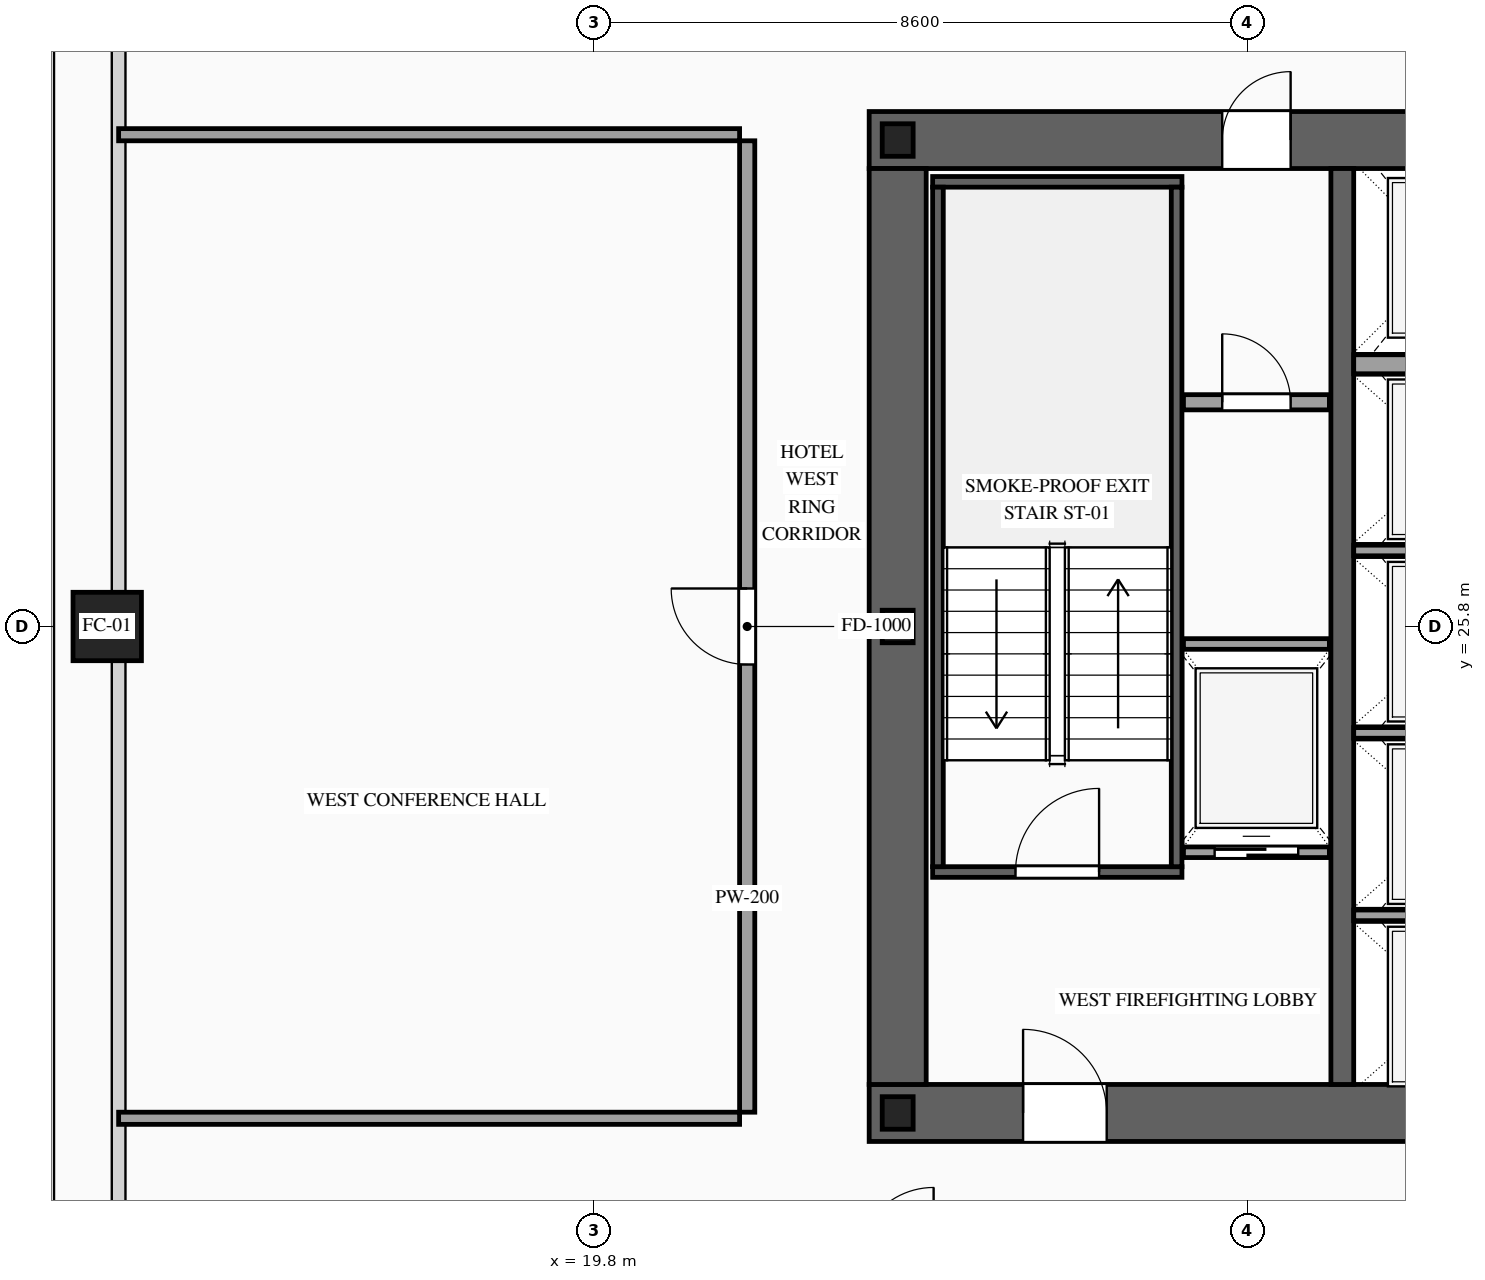
"""IFC4 building model, lengths in metres.
Left out: names, types, materials, properties, quantities, classifications, styles, units other than length and angle.
Written with IfcOpenShell. Run it as: python <this file> out.ifc"""

import sys

from ifc_helpers import new_model, si_unit, direction, frame, frame_2d, origin, origin_2d, place, context, subcontext, project, spatial, rectangle, hollow_rectangle, i_section, extrude, source, transform, mapped, element, fill, save


model = new_model("IFC4")
c1 = context("Model", 3, precision=1e-05, world=origin(), true_north=direction((0.0, 1.0)))
c2 = subcontext(c1, "Body", "Model", "MODEL_VIEW")
j1 = project(units=[si_unit("LENGTHUNIT", "METRE"), si_unit("PLANEANGLEUNIT", "RADIAN")], contexts=[c1])
p1 = place(None, origin())
s1 = spatial("IfcSite", under=j1, at=p1, CompositionType="ELEMENT")
p2 = place(p1, origin())
s2 = spatial("IfcBuilding", under=s1, at=p2, CompositionType="ELEMENT")
p3 = place(p2, frame((0.0, 0.0, 111.8)))
s3 = spatial("IfcBuildingStorey", under=s2, at=p3, CompositionType="ELEMENT", Elevation=111.8)
p4 = place(p3, frame((23.425, 19.4, 0.0), z_axis=(0.0, 0.0, 1.0), x_axis=(1.0, 0.0, 0.0)))
e1 = element("IfcWall", 1, at=p4, inside=s3, PredefinedType="SHEAR", context=c2, shape_type="SweptSolid", body=[
    extrude(rectangle(XDim=27.15, YDim=0.75, at=frame_2d((13.575, 0.0))), origin(), (0.0, 0.0, 1.0), 3.6),
])
p5 = place(p4, frame((2.025, 0.0, 0.0)))
e2 = element("IfcOpeningElement", 2, at=p5, cuts=e1, PredefinedType="OPENING", context=c2, shape_type="SweptSolid", body=[
    extrude(rectangle(XDim=1.1, YDim=2.2, at=frame_2d((0.55, 1.1))), frame((0.0, 0.39, 0.0), z_axis=(0.0, -1.0, 0.0), x_axis=(1.0, 0.0, 0.0)), (0.0, 0.0, 1.0), 0.78),
])
p6 = place(p4, frame((9.925, 0.0, 0.0)))
e3 = element("IfcOpeningElement", 3, at=p6, cuts=e1, PredefinedType="OPENING", context=c2, shape_type="SweptSolid", body=[
    extrude(rectangle(XDim=1.1, YDim=2.2, at=frame_2d((0.55, 1.1))), frame((0.0, 0.39, 0.0), z_axis=(0.0, -1.0, 0.0), x_axis=(1.0, 0.0, 0.0)), (0.0, 0.0, 1.0), 0.78),
])
p7 = place(p4, frame((23.125, 0.0, 0.0)))
e4 = element("IfcOpeningElement", 4, at=p7, cuts=e1, PredefinedType="OPENING", context=c2, shape_type="SweptSolid", body=[
    extrude(rectangle(XDim=1.1, YDim=2.2, at=frame_2d((0.55, 1.1))), frame((0.0, 0.39, 0.0), z_axis=(0.0, -1.0, 0.0), x_axis=(1.0, 0.0, 0.0)), (0.0, 0.0, 1.0), 0.78),
])
p8 = place(p4, frame((19.745, 0.0, 0.0)))
e5 = element("IfcOpeningElement", 5, at=p8, cuts=e1, PredefinedType="OPENING", context=c2, shape_type="SweptSolid", body=[
    extrude(rectangle(XDim=0.9, YDim=2.15, at=frame_2d((0.45, 1.075))), frame((0.0, 0.39, 0.0), z_axis=(0.0, -1.0, 0.0), x_axis=(1.0, 0.0, 0.0)), (0.0, 0.0, 1.0), 0.78),
])
p9 = place(p4, frame((18.305, 0.0, 0.0)))
e6 = element("IfcOpeningElement", 6, at=p9, cuts=e1, PredefinedType="OPENING", context=c2, shape_type="SweptSolid", body=[
    extrude(rectangle(XDim=0.9, YDim=2.15, at=frame_2d((0.45, 1.075))), frame((0.0, 0.39, 0.0), z_axis=(0.0, -1.0, 0.0), x_axis=(1.0, 0.0, 0.0)), (0.0, 0.0, 1.0), 0.78),
])
p10 = place(p3, frame((23.425, 32.2, 0.0), z_axis=(0.0, 0.0, 1.0), x_axis=(1.0, 0.0, 0.0)))
e7 = element("IfcWall", 7, at=p10, inside=s3, PredefinedType="SHEAR", context=c2, shape_type="SweptSolid", body=[
    extrude(rectangle(XDim=27.15, YDim=0.75, at=frame_2d((13.575, 0.0))), origin(), (0.0, 0.0, 1.0), 3.6),
])
p11 = place(p10, frame((4.645, 0.0, 0.0)))
e8 = element("IfcOpeningElement", 8, at=p11, cuts=e7, PredefinedType="OPENING", context=c2, shape_type="SweptSolid", body=[
    extrude(rectangle(XDim=0.9, YDim=2.15, at=frame_2d((0.45, 1.075))), frame((0.0, 0.39, 0.0), z_axis=(0.0, -1.0, 0.0), x_axis=(1.0, 0.0, 0.0)), (0.0, 0.0, 1.0), 0.78),
])
p12 = place(p10, frame((9.925, 0.0, 0.0)))
e9 = element("IfcOpeningElement", 9, at=p12, cuts=e7, PredefinedType="OPENING", context=c2, shape_type="SweptSolid", body=[
    extrude(rectangle(XDim=1.1, YDim=2.2, at=frame_2d((0.55, 1.1))), frame((0.0, 0.39, 0.0), z_axis=(0.0, -1.0, 0.0), x_axis=(1.0, 0.0, 0.0)), (0.0, 0.0, 1.0), 0.78),
])
p13 = place(p10, frame((15.775, 0.0, 0.0)))
e10 = element("IfcOpeningElement", 10, at=p13, cuts=e7, PredefinedType="OPENING", context=c2, shape_type="SweptSolid", body=[
    extrude(rectangle(XDim=1.1, YDim=2.2, at=frame_2d((0.55, 1.1))), frame((0.0, 0.39, 0.0), z_axis=(0.0, -1.0, 0.0), x_axis=(1.0, 0.0, 0.0)), (0.0, 0.0, 1.0), 0.78),
])
p14 = place(p10, frame((18.305, 0.0, 0.0)))
e11 = element("IfcOpeningElement", 11, at=p14, cuts=e7, PredefinedType="OPENING", context=c2, shape_type="SweptSolid", body=[
    extrude(rectangle(XDim=0.9, YDim=2.15, at=frame_2d((0.45, 1.075))), frame((0.0, 0.39, 0.0), z_axis=(0.0, -1.0, 0.0), x_axis=(1.0, 0.0, 0.0)), (0.0, 0.0, 1.0), 0.78),
])
p15 = place(p10, frame((19.745, 0.0, 0.0)))
e12 = element("IfcOpeningElement", 12, at=p15, cuts=e7, PredefinedType="OPENING", context=c2, shape_type="SweptSolid", body=[
    extrude(rectangle(XDim=0.9, YDim=2.15, at=frame_2d((0.45, 1.075))), frame((0.0, 0.39, 0.0), z_axis=(0.0, -1.0, 0.0), x_axis=(1.0, 0.0, 0.0)), (0.0, 0.0, 1.0), 0.78),
])
m1 = source(origin(), c2, "Body", "SweptSolid", [
    extrude(rectangle(XDim=12.05, YDim=0.75, at=frame_2d((6.025, 0.0))), origin(), (0.0, 0.0, 1.0), 3.6),
])
p16 = place(p3, frame((23.8, 19.775, 0.0), z_axis=(0.0, 0.0, 1.0), x_axis=(0.0, 1.0, 0.0)))
e13 = element("IfcWall", 13, at=p16, inside=s3, PredefinedType="SHEAR", context=c2, shape_type="MappedRepresentation", body=[
    mapped(m1, transform((0.0, 0.0, 0.0), scale=1.0)),
])
m2 = source(origin(), c2, "Body", "SweptSolid", [
    extrude(rectangle(XDim=12.05, YDim=0.3, at=frame_2d((6.025, 0.0))), origin(), (0.0, 0.0, 1.0), 3.6),
])
p17 = place(p3, frame((29.65, 19.775, 0.0), z_axis=(0.0, 0.0, 1.0), x_axis=(0.0, 1.0, 0.0)))
e14 = element("IfcWall", 14, at=p17, inside=s3, PredefinedType="SOLIDWALL", context=c2, shape_type="MappedRepresentation", body=[
    mapped(m2, transform((0.0, 0.0, 0.0), scale=1.0)),
])
m3 = source(origin(), c2, "Body", "SweptSolid", [
    extrude(i_section(OverallWidth=0.407, OverallDepth=0.428, WebThickness=0.02, FlangeThickness=0.035, at=origin_2d()), origin(), (0.0, 0.0, 1.0), 3.6),
])
for number, where, z_axis, x_axis in (
    (15, (23.8, 19.4, 0.0), (0.0, 0.0, 1.0), (1.0, 0.0, 0.0)),
    (16, (23.8, 25.8, 0.0), (0.0, 0.0, 1.0), (1.0, 0.0, 0.0)),
    (17, (23.8, 32.2, 0.0), (0.0, 0.0, 1.0), (1.0, 0.0, 0.0)),
):
    element("IfcColumn", number, at=place(p3, frame(where, z_axis=z_axis, x_axis=x_axis)), inside=s3, PredefinedType="COLUMN", context=c2, shape_type="MappedRepresentation", body=[
        mapped(m3, transform((0.0, 0.0, 0.0), scale=1.0)),
    ])
m4 = source(origin(), c2, "Body", "SweptSolid", [
    extrude(hollow_rectangle(XDim=0.9, YDim=0.9, WallThickness=0.042, at=origin_2d()), origin(), (0.0, 0.0, 1.0), 3.6),
])
p18 = place(p3, frame((13.4, 25.8, 0.0), z_axis=(0.0, 0.0, 1.0), x_axis=(1.0, 0.0, 0.0)))
e18 = element("IfcColumn", 18, at=p18, inside=s3, PredefinedType="COLUMN", context=c2, shape_type="MappedRepresentation", body=[
    mapped(m4, transform((0.0, 0.0, 0.0), scale=1.0)),
])
p19 = place(p3, frame((27.56, 22.83, 0.0), z_axis=(0.0, 0.0, 1.0), x_axis=(1.0, 0.0, 0.0)))
e19 = element("IfcWall", 19, at=p19, inside=s3, PredefinedType="SOLIDWALL", context=c2, shape_type="SweptSolid", body=[
    extrude(rectangle(XDim=1.92, YDim=0.14, at=frame_2d((0.96, 0.0))), origin(), (0.0, 0.0, 1.0), 3.38),
])
p20 = place(p19, frame((0.41, 0.0, 0.0)))
e20 = element("IfcOpeningElement", 20, at=p20, cuts=e19, PredefinedType="OPENING", context=c2, shape_type="SweptSolid", body=[
    extrude(rectangle(XDim=1.1, YDim=2.2, at=frame_2d((0.55, 1.1))), frame((0.0, 0.085, 0.0), z_axis=(0.0, -1.0, 0.0), x_axis=(1.0, 0.0, 0.0)), (0.0, 0.0, 1.0), 0.17),
])
m5 = source(origin(), c2, "Body", "SweptSolid", [
    extrude(rectangle(XDim=1.92, YDim=0.14, at=frame_2d((0.96, 0.0))), origin(), (0.0, 0.0, 1.0), 3.38),
])
p21 = place(p3, frame((27.56, 25.57, 0.0), z_axis=(0.0, 0.0, 1.0), x_axis=(1.0, 0.0, 0.0)))
e21 = element("IfcWall", 21, at=p21, inside=s3, PredefinedType="SOLIDWALL", context=c2, shape_type="MappedRepresentation", body=[
    mapped(m5, transform((0.0, 0.0, 0.0), scale=1.0)),
])
m6 = source(origin(), c2, "Body", "SweptSolid", [
    extrude(rectangle(XDim=2.5, YDim=0.14, at=frame_2d((1.25, 0.0))), origin(), (0.0, 0.0, 1.0), 3.38),
])
for number, where, z_axis, x_axis in (
    (22, (29.8, 22.0, 0.0), (0.0, 0.0, 1.0), (1.0, 0.0, 0.0)),
    (23, (29.8, 24.4, 0.0), (0.0, 0.0, 1.0), (1.0, 0.0, 0.0)),
    (24, (29.8, 26.8, 0.0), (0.0, 0.0, 1.0), (1.0, 0.0, 0.0)),
):
    element("IfcWall", number, at=place(p3, frame(where, z_axis=z_axis, x_axis=x_axis)), inside=s3, PredefinedType="SOLIDWALL", context=c2, shape_type="MappedRepresentation", body=[
        mapped(m6, transform((0.0, 0.0, 0.0), scale=1.0)),
    ])
m7 = source(origin(), c2, "Body", "SweptSolid", [
    extrude(rectangle(XDim=2.5, YDim=0.25, at=frame_2d((1.25, 0.0))), origin(), (0.0, 0.0, 1.0), 3.38),
])
p22 = place(p3, frame((29.8, 29.25, 0.0), z_axis=(0.0, 0.0, 1.0), x_axis=(1.0, 0.0, 0.0)))
e25 = element("IfcWall", 25, at=p22, inside=s3, PredefinedType="SOLIDWALL", context=c2, shape_type="MappedRepresentation", body=[
    mapped(m7, transform((0.0, 0.0, 0.0), scale=1.0)),
])
p23 = place(p3, frame((24.26, 22.57, 0.0), z_axis=(0.0, 0.0, 1.0), x_axis=(1.0, 0.0, 0.0)))
e26 = element("IfcWall", 26, at=p23, inside=s3, PredefinedType="SOLIDWALL", context=c2, shape_type="SweptSolid", body=[
    extrude(rectangle(XDim=3.28, YDim=0.14, at=frame_2d((1.64, 0.0))), origin(), (0.0, 0.0, 1.0), 3.38),
])
p24 = place(p23, frame((1.09, 0.0, 0.0)))
e27 = element("IfcOpeningElement", 27, at=p24, cuts=e26, PredefinedType="OPENING", context=c2, shape_type="SweptSolid", body=[
    extrude(rectangle(XDim=1.1, YDim=2.2, at=frame_2d((0.55, 1.1))), frame((0.0, 0.085, 0.0), z_axis=(0.0, -1.0, 0.0), x_axis=(1.0, 0.0, 0.0)), (0.0, 0.0, 1.0), 0.17),
])
m8 = source(origin(), c2, "Body", "SweptSolid", [
    extrude(rectangle(XDim=3.28, YDim=0.14, at=frame_2d((1.64, 0.0))), origin(), (0.0, 0.0, 1.0), 3.38),
])
p25 = place(p3, frame((24.26, 31.65, 0.0), z_axis=(0.0, 0.0, 1.0), x_axis=(1.0, 0.0, 0.0)))
e28 = element("IfcWall", 28, at=p25, inside=s3, PredefinedType="SOLIDWALL", context=c2, shape_type="MappedRepresentation", body=[
    mapped(m8, transform((0.0, 0.0, 0.0), scale=1.0)),
])
m9 = source(origin(), c2, "Body", "SweptSolid", [
    extrude(rectangle(XDim=8.94, YDim=0.14, at=frame_2d((4.47, 0.0))), origin(), (0.0, 0.0, 1.0), 3.38),
])
for number, where, z_axis, x_axis in (
    (29, (24.33, 22.64, 0.0), (0.0, 0.0, 1.0), (0.0, 1.0, 0.0)),
    (30, (27.47, 22.64, 0.0), (0.0, 0.0, 1.0), (0.0, 1.0, 0.0)),
):
    element("IfcWall", number, at=place(p3, frame(where, z_axis=z_axis, x_axis=x_axis)), inside=s3, PredefinedType="SOLIDWALL", context=c2, shape_type="MappedRepresentation", body=[
        mapped(m9, transform((0.0, 0.0, 0.0), scale=1.0)),
    ])
p26 = place(p3, frame((27.56, 28.75, 0.0), z_axis=(0.0, 0.0, 1.0), x_axis=(1.0, 0.0, 0.0)))
e31 = element("IfcWall", 31, at=p26, inside=s3, PredefinedType="PARTITIONING", context=c2, shape_type="SweptSolid", body=[
    extrude(rectangle(XDim=1.92, YDim=0.2, at=frame_2d((0.96, 0.0))), origin(), (0.0, 0.0, 1.0), 3.38),
])
p27 = place(p26, frame((0.51, 0.0, 0.0)))
e32 = element("IfcOpeningElement", 32, at=p27, cuts=e31, PredefinedType="OPENING", context=c2, shape_type="SweptSolid", body=[
    extrude(rectangle(XDim=0.9, YDim=2.15, at=frame_2d((0.45, 1.075))), frame((0.0, 0.115, 0.0), z_axis=(0.0, -1.0, 0.0), x_axis=(1.0, 0.0, 0.0)), (0.0, 0.0, 1.0), 0.23),
])
p28 = place(p3, frame((21.82, 19.41, 0.0), z_axis=(0.0, 0.0, 1.0), x_axis=(0.0, 1.0, 0.0)))
e33 = element("IfcWall", 33, at=p28, inside=s3, PredefinedType="PARTITIONING", context=c2, shape_type="SweptSolid", body=[
    extrude(rectangle(XDim=12.78, YDim=0.2, at=frame_2d((6.39, 0.0))), origin(), (0.0, 0.0, 1.0), 3.38),
])
p29 = place(p28, frame((5.89, 0.0, 0.0)))
e34 = element("IfcOpeningElement", 34, at=p29, cuts=e33, PredefinedType="OPENING", context=c2, shape_type="SweptSolid", body=[
    extrude(rectangle(XDim=1.0, YDim=2.2, at=frame_2d((0.5, 1.1))), frame((0.0, 0.115, 0.0), z_axis=(0.0, -1.0, 0.0), x_axis=(1.0, 0.0, 0.0)), (0.0, 0.0, 1.0), 0.23),
])
m10 = source(origin(), c2, "Body", "SweptSolid", [
    extrude(rectangle(XDim=8.17, YDim=0.16, at=frame_2d((4.085, 0.0))), origin(), (0.0, 0.0, 1.0), 2.875),
])
for number, where, z_axis, x_axis in (
    (35, (13.55, 19.33, 0.0), (0.0, 0.0, 1.0), (1.0, 0.0, 0.0)),
    (36, (13.55, 32.27, 0.0), (0.0, 0.0, 1.0), (1.0, 0.0, 0.0)),
):
    element("IfcWall", number, at=place(p3, frame(where, z_axis=z_axis, x_axis=x_axis)), inside=s3, PredefinedType="PARTITIONING", context=c2, shape_type="MappedRepresentation", body=[
        mapped(m10, transform((0.0, 0.0, 0.0), scale=1.0)),
    ])
m11 = source(origin(), c2, "Body", "SweptSolid", [
    extrude(rectangle(XDim=1.1, YDim=2.2, at=frame_2d((0.55, 1.1))), frame((0.0, 0.025, 0.0), z_axis=(0.0, -1.0, 0.0), x_axis=(1.0, 0.0, 0.0)), (0.0, 0.0, 1.0), 0.05),
])
p30 = place(p20, origin())
e37 = element("IfcDoor", 37, at=p30, inside=s3, OperationType="SLIDING_TO_LEFT", PredefinedType="DOOR", context=c2, shape_type="MappedRepresentation", body=[
    mapped(m11, transform((0.0, 0.0, 0.0), scale=1.0)),
])
fill(e20, e37)
m12 = source(origin(), c2, "Body", "SweptSolid", [
    extrude(rectangle(XDim=1.1, YDim=2.2, at=frame_2d((0.55, 1.1))), frame((0.0, 0.025, 0.0), z_axis=(0.0, -1.0, 0.0), x_axis=(1.0, 0.0, 0.0)), (0.0, 0.0, 1.0), 0.05),
])
p31 = place(p24, origin())
e38 = element("IfcDoor", 38, at=p31, inside=s3, OperationType="SINGLE_SWING_RIGHT", PredefinedType="DOOR", context=c2, shape_type="MappedRepresentation", body=[
    mapped(m12, transform((0.0, 0.0, 0.0), scale=1.0)),
])
fill(e27, e38)
p32 = place(p5, origin())
e39 = element("IfcDoor", 39, at=p32, inside=s3, OperationType="SINGLE_SWING_LEFT", PredefinedType="DOOR", context=c2, shape_type="MappedRepresentation", body=[
    mapped(m12, transform((0.0, 0.0, 0.0), scale=1.0)),
])
fill(e2, e39)
m13 = source(origin(), c2, "Body", "SweptSolid", [
    extrude(rectangle(XDim=0.9, YDim=2.15, at=frame_2d((0.45, 1.075))), frame((0.0, 0.025, 0.0), z_axis=(0.0, -1.0, 0.0), x_axis=(1.0, 0.0, 0.0)), (0.0, 0.0, 1.0), 0.05),
])
p33 = place(p11, origin())
e40 = element("IfcDoor", 40, at=p33, inside=s3, OperationType="SINGLE_SWING_RIGHT", PredefinedType="DOOR", context=c2, shape_type="MappedRepresentation", body=[
    mapped(m13, transform((0.0, 0.0, 0.0), scale=1.0)),
])
fill(e8, e40)
p34 = place(p27, origin())
e41 = element("IfcDoor", 41, at=p34, inside=s3, OperationType="SINGLE_SWING_LEFT", PredefinedType="DOOR", context=c2, shape_type="MappedRepresentation", body=[
    mapped(m13, transform((0.0, 0.0, 0.0), scale=1.0)),
])
fill(e32, e41)
m14 = source(origin(), c2, "Body", "SweptSolid", [
    extrude(rectangle(XDim=1.0, YDim=2.2, at=frame_2d((0.5, 1.1))), frame((0.0, 0.025, 0.0), z_axis=(0.0, -1.0, 0.0), x_axis=(1.0, 0.0, 0.0)), (0.0, 0.0, 1.0), 0.05),
])
p35 = place(p29, origin())
e42 = element("IfcDoor", 42, at=p35, inside=s3, OperationType="SINGLE_SWING_RIGHT", PredefinedType="DOOR", context=c2, shape_type="MappedRepresentation", body=[
    mapped(m14, transform((0.0, 0.0, 0.0), scale=1.0)),
])
fill(e34, e42)
save(model, sys.argv[1])
